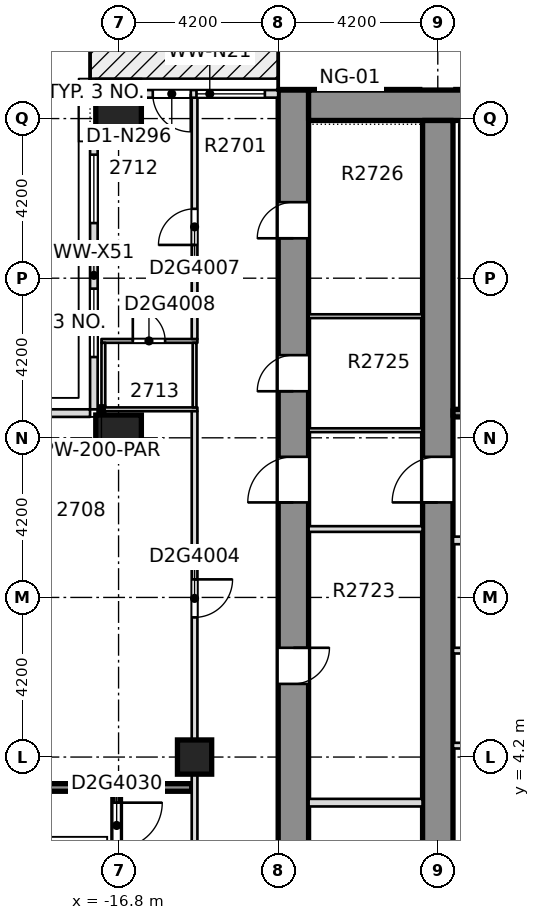
"""IFC4 building model, lengths in metres.
Left out: names, types, materials, properties, quantities, classifications, styles, units other than length and angle.
Written with IfcOpenShell. Run it as: python <this file> out.ifc"""

import sys

from ifc_helpers import new_model, si_unit, direction, frame, frame_2d, origin, origin_2d, place, context, subcontext, project, spatial, rectangle, extrude, element, fill, save


model = new_model("IFC4")
c1 = context("Model", 3, precision=1e-05, world=origin(), true_north=direction((0.0, 1.0)))
c2 = subcontext(c1, "Body", "Model", "MODEL_VIEW")
j1 = project(units=[si_unit("LENGTHUNIT", "METRE"), si_unit("PLANEANGLEUNIT", "RADIAN")], contexts=[c1])
p1 = place(None, origin())
s1 = spatial("IfcSite", under=j1, at=p1, CompositionType="ELEMENT")
p2 = place(p1, origin())
s2 = spatial("IfcBuilding", under=s1, at=p2, CompositionType="ELEMENT")
p3 = place(p2, frame((0.0, 0.0, 108.0)))
s3 = spatial("IfcBuildingStorey", under=s2, at=p3, CompositionType="ELEMENT", Elevation=108.0)
p4 = place(p3, frame((-12.2, -8.4, -0.32), z_axis=(0.0, 0.0, 1.0), x_axis=(0.0, 1.0, 0.0)))
e1 = element("IfcWall", 1, at=p4, inside=s3, PredefinedType="SHEAR", context=c2, shape_type="SweptSolid", body=[
    extrude(rectangle(XDim=30.15, YDim=0.8, at=frame_2d((15.075, 0.0))), origin(), (0.0, 0.0, 1.0), 3.45),
])
p5 = place(p4, frame((3.925, 0.0, 0.32)))
e2 = element("IfcOpeningElement", 2, at=p5, cuts=e1, PredefinedType="OPENING", context=c2, shape_type="SweptSolid", body=[
    extrude(rectangle(XDim=0.95, YDim=2.1, at=frame_2d((0.475, 1.05))), frame((0.0, 0.41, 0.0), z_axis=(0.0, -1.0, 0.0), x_axis=(1.0, 0.0, 0.0)), (0.0, 0.0, 1.0), 0.82),
])
p6 = place(p4, frame((9.175, 0.0, 0.32)))
e3 = element("IfcOpeningElement", 3, at=p6, cuts=e1, PredefinedType="OPENING", context=c2, shape_type="SweptSolid", body=[
    extrude(rectangle(XDim=0.95, YDim=2.1, at=frame_2d((0.475, 1.05))), frame((0.0, 0.41, 0.0), z_axis=(0.0, -1.0, 0.0), x_axis=(1.0, 0.0, 0.0)), (0.0, 0.0, 1.0), 0.82),
])
p7 = place(p4, frame((14.525, 0.0, 0.32)))
e4 = element("IfcOpeningElement", 4, at=p7, cuts=e1, PredefinedType="OPENING", context=c2, shape_type="SweptSolid", body=[
    extrude(rectangle(XDim=0.95, YDim=2.1, at=frame_2d((0.475, 1.05))), frame((0.0, 0.41, 0.0), z_axis=(0.0, -1.0, 0.0), x_axis=(1.0, 0.0, 0.0)), (0.0, 0.0, 1.0), 0.82),
])
p8 = place(p4, frame((22.225, 0.0, 0.32)))
e5 = element("IfcOpeningElement", 5, at=p8, cuts=e1, PredefinedType="OPENING", context=c2, shape_type="SweptSolid", body=[
    extrude(rectangle(XDim=0.95, YDim=2.1, at=frame_2d((0.475, 1.05))), frame((0.0, 0.41, 0.0), z_axis=(0.0, -1.0, 0.0), x_axis=(1.0, 0.0, 0.0)), (0.0, 0.0, 1.0), 0.82),
])
p9 = place(p4, frame((26.25, 0.0, 0.32)))
e6 = element("IfcOpeningElement", 6, at=p9, cuts=e1, PredefinedType="OPENING", context=c2, shape_type="SweptSolid", body=[
    extrude(rectangle(XDim=0.95, YDim=2.1, at=frame_2d((0.475, 1.05))), frame((0.0, 0.41, 0.0), z_axis=(0.0, -1.0, 0.0), x_axis=(1.0, 0.0, 0.0)), (0.0, 0.0, 1.0), 0.82),
])
p10 = place(p4, frame((19.3, 0.0, 0.32)))
e7 = element("IfcOpeningElement", 7, at=p10, cuts=e1, PredefinedType="OPENING", context=c2, shape_type="SweptSolid", body=[
    extrude(rectangle(XDim=1.2, YDim=2.1, at=frame_2d((0.6, 1.05))), frame((0.0, 0.41, 0.0), z_axis=(0.0, -1.0, 0.0), x_axis=(1.0, 0.0, 0.0)), (0.0, 0.0, 1.0), 0.82),
])
p11 = place(p3, frame((-11.8, 21.35, -0.32), z_axis=(0.0, 0.0, 1.0), x_axis=(1.0, 0.0, 0.0)))
e8 = element("IfcWall", 8, at=p11, inside=s3, PredefinedType="SHEAR", context=c2, shape_type="SweptSolid", body=[
    extrude(rectangle(XDim=23.6, YDim=0.8, at=frame_2d((11.8, 0.0))), origin(), (0.0, 0.0, 1.0), 3.45),
])
p12 = place(p3, frame((-8.4, -7.6, -0.32), z_axis=(0.0, 0.0, 1.0), x_axis=(0.0, 1.0, 0.0)))
e9 = element("IfcWall", 9, at=p12, inside=s3, PredefinedType="SHEAR", context=c2, shape_type="SweptSolid", body=[
    extrude(rectangle(XDim=28.55, YDim=0.8, at=frame_2d((14.275, 0.0))), origin(), (0.0, 0.0, 1.0), 3.45),
])
p13 = place(p12, frame((18.5, 0.0, 0.32)))
e10 = element("IfcOpeningElement", 10, at=p13, cuts=e9, PredefinedType="OPENING", context=c2, shape_type="SweptSolid", body=[
    extrude(rectangle(XDim=1.2, YDim=2.1, at=frame_2d((0.6, 1.05))), frame((0.0, 0.41, 0.0), z_axis=(0.0, -1.0, 0.0), x_axis=(1.0, 0.0, 0.0)), (0.0, 0.0, 1.0), 0.82),
])
for number, where, z_axis, x_axis in (
    (11, (-16.8, 12.6, -0.32), (0.0, 0.0, 1.0), (1.0, 0.0, 0.0)),
    (12, (-16.8, 21.0, -0.32), (0.0, 0.0, 1.0), (1.0, 0.0, 0.0)),
):
    element("IfcColumn", number, at=place(p3, frame(where, z_axis=z_axis, x_axis=x_axis)), inside=s3, PredefinedType="COLUMN", context=c2, shape_type="SweptSolid", body=[
        extrude(rectangle(XDim=1.2, YDim=1.2, at=origin_2d()), origin(), (0.0, 0.0, 1.0), 3.45),
    ])
p14 = place(p3, frame((-14.8, 4.2, -0.32), z_axis=(0.0, 0.0, 1.0), x_axis=(1.0, 0.0, 0.0)))
e13 = element("IfcColumn", 13, at=p14, inside=s3, PredefinedType="COLUMN", context=c2, shape_type="SweptSolid", body=[
    extrude(rectangle(XDim=0.9, YDim=0.9, at=origin_2d()), origin(), (0.0, 0.0, 1.0), 3.45),
])
p15 = place(p3, frame((-20.45, 3.4, 0.0), z_axis=(0.0, 0.0, 1.0), x_axis=(1.0, 0.0, 0.0)))
e14 = element("IfcWall", 14, at=p15, inside=s3, PredefinedType="SOLIDWALL", context=c2, shape_type="SweptSolid", body=[
    extrude(rectangle(XDim=5.575, YDim=0.2, at=frame_2d((2.788, 0.0))), origin(), (0.0, 0.0, 1.0), 3.13),
])
p16 = place(p3, frame((-17.35, 13.35, 0.0), z_axis=(0.0, 0.0, 1.0), x_axis=(1.0, 0.0, 0.0)))
e15 = element("IfcWall", 15, at=p16, inside=s3, PredefinedType="PARTITIONING", context=c2, shape_type="SweptSolid", body=[
    extrude(rectangle(XDim=0.2, YDim=0.2, at=frame_2d((0.1, 0.0))), origin(), (0.0, 0.0, 1.0), 3.13),
])
p17 = place(p3, frame((-17.25, 13.35, 0.0), z_axis=(0.0, 0.0, 1.0), x_axis=(1.0, 0.0, 0.0)))
e16 = element("IfcWall", 16, at=p17, inside=s3, PredefinedType="PARTITIONING", context=c2, shape_type="SweptSolid", body=[
    extrude(rectangle(XDim=2.525, YDim=0.1, at=frame_2d((1.262, 0.0))), origin(), (0.0, 0.0, 1.0), 3.13),
])
p18 = place(p3, frame((-17.25, 15.15, 0.0), z_axis=(0.0, 0.0, 1.0), x_axis=(1.0, 0.0, 0.0)))
e17 = element("IfcWall", 17, at=p18, inside=s3, PredefinedType="PARTITIONING", context=c2, shape_type="SweptSolid", body=[
    extrude(rectangle(XDim=2.525, YDim=0.1, at=frame_2d((1.262, 0.0))), origin(), (0.0, 0.0, 1.0), 3.13),
])
p19 = place(p18, frame((0.825, 0.0, 0.0)))
e18 = element("IfcOpeningElement", 18, at=p19, cuts=e17, PredefinedType="OPENING", context=c2, shape_type="SweptSolid", body=[
    extrude(rectangle(XDim=0.85, YDim=2.1, at=frame_2d((0.425, 1.05))), frame((0.0, 0.06, 0.0), z_axis=(0.0, -1.0, 0.0), x_axis=(1.0, 0.0, 0.0)), (0.0, 0.0, 1.0), 0.12),
])
p20 = place(p3, frame((-17.2, 13.45, 0.0), z_axis=(0.0, 0.0, 1.0), x_axis=(0.0, 1.0, 0.0)))
e19 = element("IfcWall", 19, at=p20, inside=s3, PredefinedType="PARTITIONING", context=c2, shape_type="SweptSolid", body=[
    extrude(rectangle(XDim=1.65, YDim=0.1, at=frame_2d((0.825, 0.0))), origin(), (0.0, 0.0, 1.0), 3.13),
])
p21 = place(p3, frame((-16.85, -3.3, 0.0), z_axis=(0.0, 0.0, 1.0), x_axis=(0.0, 1.0, 0.0)))
e20 = element("IfcWall", 20, at=p21, inside=s3, PredefinedType="SOLIDWALL", context=c2, shape_type="SweptSolid", body=[
    extrude(rectangle(XDim=6.6, YDim=0.2, at=frame_2d((3.3, 0.0))), origin(), (0.0, 0.0, 1.0), 3.13),
])
p22 = place(p21, frame((5.1, 0.0, 0.0)))
e21 = element("IfcOpeningElement", 21, at=p22, cuts=e20, PredefinedType="OPENING", context=c2, shape_type="SweptSolid", body=[
    extrude(rectangle(XDim=1.2, YDim=2.1, at=frame_2d((0.6, 1.05))), frame((0.0, 0.11, 0.0), z_axis=(0.0, -1.0, 0.0), x_axis=(1.0, 0.0, 0.0)), (0.0, 0.0, 1.0), 0.22),
])
p23 = place(p3, frame((-14.8, -5.223, 0.0), z_axis=(0.0, 0.0, 1.0), x_axis=(0.0, 1.0, 0.0)))
e22 = element("IfcWall", 22, at=p23, inside=s3, PredefinedType="PARTITIONING", context=c2, shape_type="SweptSolid", body=[
    extrude(rectangle(XDim=18.523, YDim=0.15, at=frame_2d((9.261, 0.0))), origin(), (0.0, 0.0, 1.0), 3.13),
])
p24 = place(p23, frame((13.098, 0.0, 0.0)))
e23 = element("IfcOpeningElement", 23, at=p24, cuts=e22, PredefinedType="OPENING", context=c2, shape_type="SweptSolid", body=[
    extrude(rectangle(XDim=1.0, YDim=2.1, at=frame_2d((0.5, 1.05))), frame((0.0, 0.085, 0.0), z_axis=(0.0, -1.0, 0.0), x_axis=(1.0, 0.0, 0.0)), (0.0, 0.0, 1.0), 0.17),
])
p25 = place(p23, frame((4.673, 0.0, 0.0)))
e24 = element("IfcOpeningElement", 24, at=p25, cuts=e22, PredefinedType="OPENING", context=c2, shape_type="SweptSolid", body=[
    extrude(rectangle(XDim=1.1, YDim=2.1, at=frame_2d((0.55, 1.05))), frame((0.0, 0.085, 0.0), z_axis=(0.0, -1.0, 0.0), x_axis=(1.0, 0.0, 0.0)), (0.0, 0.0, 1.0), 0.17),
])
p26 = place(p3, frame((-14.8, 13.4, 0.0), z_axis=(0.0, 0.0, 1.0), x_axis=(0.0, 1.0, 0.0)))
e25 = element("IfcWall", 25, at=p26, inside=s3, PredefinedType="PARTITIONING", context=c2, shape_type="SweptSolid", body=[
    extrude(rectangle(XDim=1.7, YDim=0.1, at=frame_2d((0.85, 0.0))), origin(), (0.0, 0.0, 1.0), 3.13),
])
p27 = place(p3, frame((-14.8, 15.2, 0.0), z_axis=(0.0, 0.0, 1.0), x_axis=(0.0, 1.0, 0.0)))
e26 = element("IfcWall", 26, at=p27, inside=s3, PredefinedType="PARTITIONING", context=c2, shape_type="SweptSolid", body=[
    extrude(rectangle(XDim=6.35, YDim=0.15, at=frame_2d((3.175, 0.0))), origin(), (0.0, 0.0, 1.0), 3.13),
])
p28 = place(p27, frame((2.475, 0.0, 0.0)))
e27 = element("IfcOpeningElement", 27, at=p28, cuts=e26, PredefinedType="OPENING", context=c2, shape_type="SweptSolid", body=[
    extrude(rectangle(XDim=0.95, YDim=2.1, at=frame_2d((0.475, 1.05))), frame((0.0, 0.085, 0.0), z_axis=(0.0, -1.0, 0.0), x_axis=(1.0, 0.0, 0.0)), (0.0, 0.0, 1.0), 0.17),
])
p29 = place(p3, frame((-12.6, 21.65, 0.0), z_axis=(0.0, 0.0, 1.0), x_axis=(-1.0, 0.0, 0.0)))
e28 = element("IfcWall", 28, at=p29, inside=s3, PredefinedType="STANDARD", context=c2, shape_type="SweptSolid", body=[
    extrude(rectangle(XDim=3.6, YDim=0.2, at=frame_2d((1.8, 0.0))), origin(), (0.0, 0.0, 1.0), 3.13),
])
p30 = place(p29, frame((0.35, 0.0, 0.2)))
e29 = element("IfcOpeningElement", 29, at=p30, cuts=e28, PredefinedType="OPENING", context=c2, shape_type="SweptSolid", body=[
    extrude(rectangle(XDim=1.8, YDim=2.65, at=frame_2d((0.9, 1.325))), frame((0.0, 0.11, 0.0), z_axis=(0.0, -1.0, 0.0), x_axis=(1.0, 0.0, 0.0)), (0.0, 0.0, 1.0), 0.22),
])
p31 = place(p29, frame((2.3, 0.0, 0.0)))
e30 = element("IfcOpeningElement", 30, at=p31, cuts=e28, PredefinedType="OPENING", context=c2, shape_type="SweptSolid", body=[
    extrude(rectangle(XDim=1.0, YDim=2.4, at=frame_2d((0.5, 1.2))), frame((0.0, 0.11, 0.0), z_axis=(0.0, -1.0, 0.0), x_axis=(1.0, 0.0, 0.0)), (0.0, 0.0, 1.0), 0.22),
])
p32 = place(p3, frame((-17.45, 20.4, 0.0), z_axis=(0.0, 0.0, 1.0), x_axis=(0.0, -1.0, 0.0)))
e31 = element("IfcWall", 31, at=p32, inside=s3, PredefinedType="STANDARD", context=c2, shape_type="SweptSolid", body=[
    extrude(rectangle(XDim=7.05, YDim=0.2, at=frame_2d((3.525, 0.0))), origin(), (0.0, 0.0, 1.0), 3.13),
])
p33 = place(p32, frame((3.875, 0.0, 0.2)))
e32 = element("IfcOpeningElement", 32, at=p33, cuts=e31, PredefinedType="OPENING", context=c2, shape_type="SweptSolid", body=[
    extrude(rectangle(XDim=1.8, YDim=2.65, at=frame_2d((0.9, 1.325))), frame((0.0, 0.11, 0.0), z_axis=(0.0, -1.0, 0.0), x_axis=(1.0, 0.0, 0.0)), (0.0, 0.0, 1.0), 0.22),
])
p34 = place(p32, frame((0.35, 0.0, 0.2)))
e33 = element("IfcOpeningElement", 33, at=p34, cuts=e31, PredefinedType="OPENING", context=c2, shape_type="SweptSolid", body=[
    extrude(rectangle(XDim=1.8, YDim=2.65, at=frame_2d((0.9, 1.325))), frame((0.0, 0.11, 0.0), z_axis=(0.0, -1.0, 0.0), x_axis=(1.0, 0.0, 0.0)), (0.0, 0.0, 1.0), 0.22),
])
p35 = place(p3, frame((-17.55, 13.25, 0.0), z_axis=(0.0, 0.0, 1.0), x_axis=(-1.0, 0.0, 0.0)))
e34 = element("IfcWall", 34, at=p35, inside=s3, PredefinedType="STANDARD", context=c2, shape_type="SweptSolid", body=[
    extrude(rectangle(XDim=7.05, YDim=0.2, at=frame_2d((3.525, 0.0))), origin(), (0.0, 0.0, 1.0), 3.13),
])
p36 = place(p3, frame((-7.999, 4.5, 0.0), z_axis=(0.0, 0.0, 1.0), x_axis=(1.0, 0.0, 0.0)))
e35 = element("IfcWall", 35, at=p36, inside=s3, PredefinedType="PARTITIONING", context=c2, shape_type="SweptSolid", body=[
    extrude(rectangle(XDim=2.574, YDim=0.15, at=frame_2d((1.287, 0.0))), origin(), (0.0, 0.0, 1.0), 3.13),
])
p37 = place(p3, frame((-7.999, 7.0, 0.0), z_axis=(0.0, 0.0, 1.0), x_axis=(1.0, 0.0, 0.0)))
e36 = element("IfcWall", 36, at=p37, inside=s3, PredefinedType="PARTITIONING", context=c2, shape_type="SweptSolid", body=[
    extrude(rectangle(XDim=15.998, YDim=0.15, at=frame_2d((7.999, 0.0))), origin(), (0.0, 0.0, 1.0), 3.13),
])
p38 = place(p37, frame((7.299, 0.0, 0.0)))
e37 = element("IfcOpeningElement", 37, at=p38, cuts=e36, PredefinedType="OPENING", context=c2, shape_type="SweptSolid", body=[
    extrude(rectangle(XDim=1.4, YDim=2.1, at=frame_2d((0.7, 1.05))), frame((0.0, 0.085, 0.0), z_axis=(0.0, -1.0, 0.0), x_axis=(1.0, 0.0, 0.0)), (0.0, 0.0, 1.0), 0.17),
])
p39 = place(p3, frame((-7.999, 9.9, 0.0), z_axis=(0.0, 0.0, 1.0), x_axis=(1.0, 0.0, 0.0)))
e38 = element("IfcWall", 38, at=p39, inside=s3, PredefinedType="PARTITIONING", context=c2, shape_type="SweptSolid", body=[
    extrude(rectangle(XDim=4.399, YDim=0.2, at=frame_2d((2.199, 0.0))), origin(), (0.0, 0.0, 1.0), 3.13),
])
p40 = place(p39, frame((1.049, 0.0, 0.0)))
e39 = element("IfcOpeningElement", 39, at=p40, cuts=e38, PredefinedType="OPENING", context=c2, shape_type="SweptSolid", body=[
    extrude(rectangle(XDim=1.1, YDim=2.1, at=frame_2d((0.55, 1.05))), frame((0.0, 0.11, 0.0), z_axis=(0.0, -1.0, 0.0), x_axis=(1.0, 0.0, 0.0)), (0.0, 0.0, 1.0), 0.22),
])
p41 = place(p3, frame((-7.999, 13.25, 0.0), z_axis=(0.0, 0.0, 1.0), x_axis=(1.0, 0.0, 0.0)))
e40 = element("IfcWall", 40, at=p41, inside=s3, PredefinedType="SOLIDWALL", context=c2, shape_type="SweptSolid", body=[
    extrude(rectangle(XDim=4.574, YDim=0.2, at=frame_2d((2.287, 0.0))), origin(), (0.0, 0.0, 1.0), 3.13),
])
p42 = place(p41, frame((1.549, 0.0, 0.0)))
e41 = element("IfcOpeningElement", 41, at=p42, cuts=e40, PredefinedType="OPENING", context=c2, shape_type="SweptSolid", body=[
    extrude(rectangle(XDim=1.2, YDim=2.1, at=frame_2d((0.6, 1.05))), frame((0.0, 0.11, 0.0), z_axis=(0.0, -1.0, 0.0), x_axis=(1.0, 0.0, 0.0)), (0.0, 0.0, 1.0), 0.22),
])
p43 = place(p3, frame((-11.799, 3.0, 0.0), z_axis=(0.0, 0.0, 1.0), x_axis=(1.0, 0.0, 0.0)))
e42 = element("IfcWall", 42, at=p43, inside=s3, PredefinedType="PARTITIONING", context=c2, shape_type="SweptSolid", body=[
    extrude(rectangle(XDim=2.998, YDim=0.2, at=frame_2d((1.499, 0.0))), origin(), (0.0, 0.0, 1.0), 3.13),
])
p44 = place(p3, frame((-11.799, 10.2, 0.0), z_axis=(0.0, 0.0, 1.0), x_axis=(1.0, 0.0, 0.0)))
e43 = element("IfcWall", 43, at=p44, inside=s3, PredefinedType="PARTITIONING", context=c2, shape_type="SweptSolid", body=[
    extrude(rectangle(XDim=2.998, YDim=0.15, at=frame_2d((1.499, 0.0))), origin(), (0.0, 0.0, 1.0), 3.13),
])
for number, where, z_axis, x_axis in (
    (44, (-11.799, 12.8, 0.0), (0.0, 0.0, 1.0), (1.0, 0.0, 0.0)),
    (45, (-11.799, 15.8, 0.0), (0.0, 0.0, 1.0), (1.0, 0.0, 0.0)),
):
    element("IfcWall", number, at=place(p3, frame(where, z_axis=z_axis, x_axis=x_axis)), inside=s3, PredefinedType="PARTITIONING", context=c2, shape_type="SweptSolid", body=[
        extrude(rectangle(XDim=2.998, YDim=0.1, at=frame_2d((1.499, 0.0))), origin(), (0.0, 0.0, 1.0), 3.13),
    ])
p45 = place(p24, origin())
e46 = element("IfcDoor", 46, at=p45, inside=s3, OperationType="SINGLE_SWING_LEFT", PredefinedType="DOOR", context=c2, shape_type="SweptSolid", body=[
    extrude(rectangle(XDim=1.0, YDim=2.1, at=frame_2d((0.5, 1.05))), frame((0.0, 0.025, 0.0), z_axis=(0.0, -1.0, 0.0), x_axis=(1.0, 0.0, 0.0)), (0.0, 0.0, 1.0), 0.05),
])
fill(e23, e46)
p46 = place(p28, origin())
e47 = element("IfcDoor", 47, at=p46, inside=s3, OperationType="SINGLE_SWING_RIGHT", PredefinedType="DOOR", context=c2, shape_type="SweptSolid", body=[
    extrude(rectangle(XDim=0.95, YDim=2.1, at=frame_2d((0.475, 1.05))), frame((0.0, 0.025, 0.0), z_axis=(0.0, -1.0, 0.0), x_axis=(1.0, 0.0, 0.0)), (0.0, 0.0, 1.0), 0.05),
])
fill(e27, e47)
p47 = place(p19, origin())
e48 = element("IfcDoor", 48, at=p47, inside=s3, OperationType="SINGLE_SWING_RIGHT", PredefinedType="DOOR", context=c2, shape_type="SweptSolid", body=[
    extrude(rectangle(XDim=0.85, YDim=2.1, at=frame_2d((0.425, 1.05))), frame((0.0, 0.025, 0.0), z_axis=(0.0, -1.0, 0.0), x_axis=(1.0, 0.0, 0.0)), (0.0, 0.0, 1.0), 0.05),
])
fill(e18, e48)
p48 = place(p22, origin())
e49 = element("IfcDoor", 49, at=p48, inside=s3, OperationType="SINGLE_SWING_RIGHT", PredefinedType="DOOR", context=c2, shape_type="SweptSolid", body=[
    extrude(rectangle(XDim=1.2, YDim=2.1, at=frame_2d((0.6, 1.05))), frame((0.0, 0.025, 0.0), z_axis=(0.0, -1.0, 0.0), x_axis=(1.0, 0.0, 0.0)), (0.0, 0.0, 1.0), 0.05),
])
fill(e21, e49)
p49 = place(p30, origin())
e50 = element("IfcWindow", 50, at=p49, inside=s3, PartitioningType="SINGLE_PANEL", PredefinedType="WINDOW", context=c2, shape_type="SweptSolid", body=[
    extrude(rectangle(XDim=1.8, YDim=2.65, at=frame_2d((0.9, 1.325))), frame((0.0, 0.03, 0.0), z_axis=(0.0, -1.0, 0.0), x_axis=(1.0, 0.0, 0.0)), (0.0, 0.0, 1.0), 0.06),
])
fill(e29, e50)
p50 = place(p31, origin())
e51 = element("IfcDoor", 51, at=p50, inside=s3, OperationType="SINGLE_SWING_LEFT", PredefinedType="DOOR", context=c2, shape_type="SweptSolid", body=[
    extrude(rectangle(XDim=1.0, YDim=2.4, at=frame_2d((0.5, 1.2))), frame((0.0, 0.025, 0.0), z_axis=(0.0, -1.0, 0.0), x_axis=(1.0, 0.0, 0.0)), (0.0, 0.0, 1.0), 0.05),
])
fill(e30, e51)
p51 = place(p33, origin())
e52 = element("IfcWindow", 52, at=p51, inside=s3, PartitioningType="SINGLE_PANEL", PredefinedType="WINDOW", context=c2, shape_type="SweptSolid", body=[
    extrude(rectangle(XDim=1.8, YDim=2.65, at=frame_2d((0.9, 1.325))), frame((0.0, 0.03, 0.0), z_axis=(0.0, -1.0, 0.0), x_axis=(1.0, 0.0, 0.0)), (0.0, 0.0, 1.0), 0.06),
])
fill(e32, e52)
p52 = place(p34, origin())
e53 = element("IfcWindow", 53, at=p52, inside=s3, PartitioningType="SINGLE_PANEL", PredefinedType="WINDOW", context=c2, shape_type="SweptSolid", body=[
    extrude(rectangle(XDim=1.8, YDim=2.65, at=frame_2d((0.9, 1.325))), frame((0.0, 0.03, 0.0), z_axis=(0.0, -1.0, 0.0), x_axis=(1.0, 0.0, 0.0)), (0.0, 0.0, 1.0), 0.06),
])
fill(e33, e53)
p53 = place(p7, origin())
e54 = element("IfcDoor", 54, at=p53, inside=s3, OperationType="SINGLE_SWING_LEFT", PredefinedType="DOOR", context=c2, shape_type="SweptSolid", body=[
    extrude(rectangle(XDim=0.95, YDim=2.1, at=frame_2d((0.475, 1.05))), frame((0.0, 0.025, 0.0), z_axis=(0.0, -1.0, 0.0), x_axis=(1.0, 0.0, 0.0)), (0.0, 0.0, 1.0), 0.05),
])
fill(e4, e54)
p54 = place(p8, origin())
e55 = element("IfcDoor", 55, at=p54, inside=s3, OperationType="SINGLE_SWING_LEFT", PredefinedType="DOOR", context=c2, shape_type="SweptSolid", body=[
    extrude(rectangle(XDim=0.95, YDim=2.1, at=frame_2d((0.475, 1.05))), frame((0.0, 0.025, 0.0), z_axis=(0.0, -1.0, 0.0), x_axis=(1.0, 0.0, 0.0)), (0.0, 0.0, 1.0), 0.05),
])
fill(e5, e55)
p55 = place(p9, origin())
e56 = element("IfcDoor", 56, at=p55, inside=s3, OperationType="SINGLE_SWING_LEFT", PredefinedType="DOOR", context=c2, shape_type="SweptSolid", body=[
    extrude(rectangle(XDim=0.95, YDim=2.1, at=frame_2d((0.475, 1.05))), frame((0.0, 0.025, 0.0), z_axis=(0.0, -1.0, 0.0), x_axis=(1.0, 0.0, 0.0)), (0.0, 0.0, 1.0), 0.05),
])
fill(e6, e56)
p56 = place(p10, origin())
e57 = element("IfcDoor", 57, at=p56, inside=s3, OperationType="SINGLE_SWING_LEFT", PredefinedType="DOOR", context=c2, shape_type="SweptSolid", body=[
    extrude(rectangle(XDim=1.2, YDim=2.1, at=frame_2d((0.6, 1.05))), frame((0.0, 0.025, 0.0), z_axis=(0.0, -1.0, 0.0), x_axis=(1.0, 0.0, 0.0)), (0.0, 0.0, 1.0), 0.05),
])
fill(e7, e57)
p57 = place(p13, origin())
e58 = element("IfcDoor", 58, at=p57, inside=s3, OperationType="SINGLE_SWING_LEFT", PredefinedType="DOOR", context=c2, shape_type="SweptSolid", body=[
    extrude(rectangle(XDim=1.2, YDim=2.1, at=frame_2d((0.6, 1.05))), frame((0.0, 0.025, 0.0), z_axis=(0.0, -1.0, 0.0), x_axis=(1.0, 0.0, 0.0)), (0.0, 0.0, 1.0), 0.05),
])
fill(e10, e58)
save(model, sys.argv[1])
